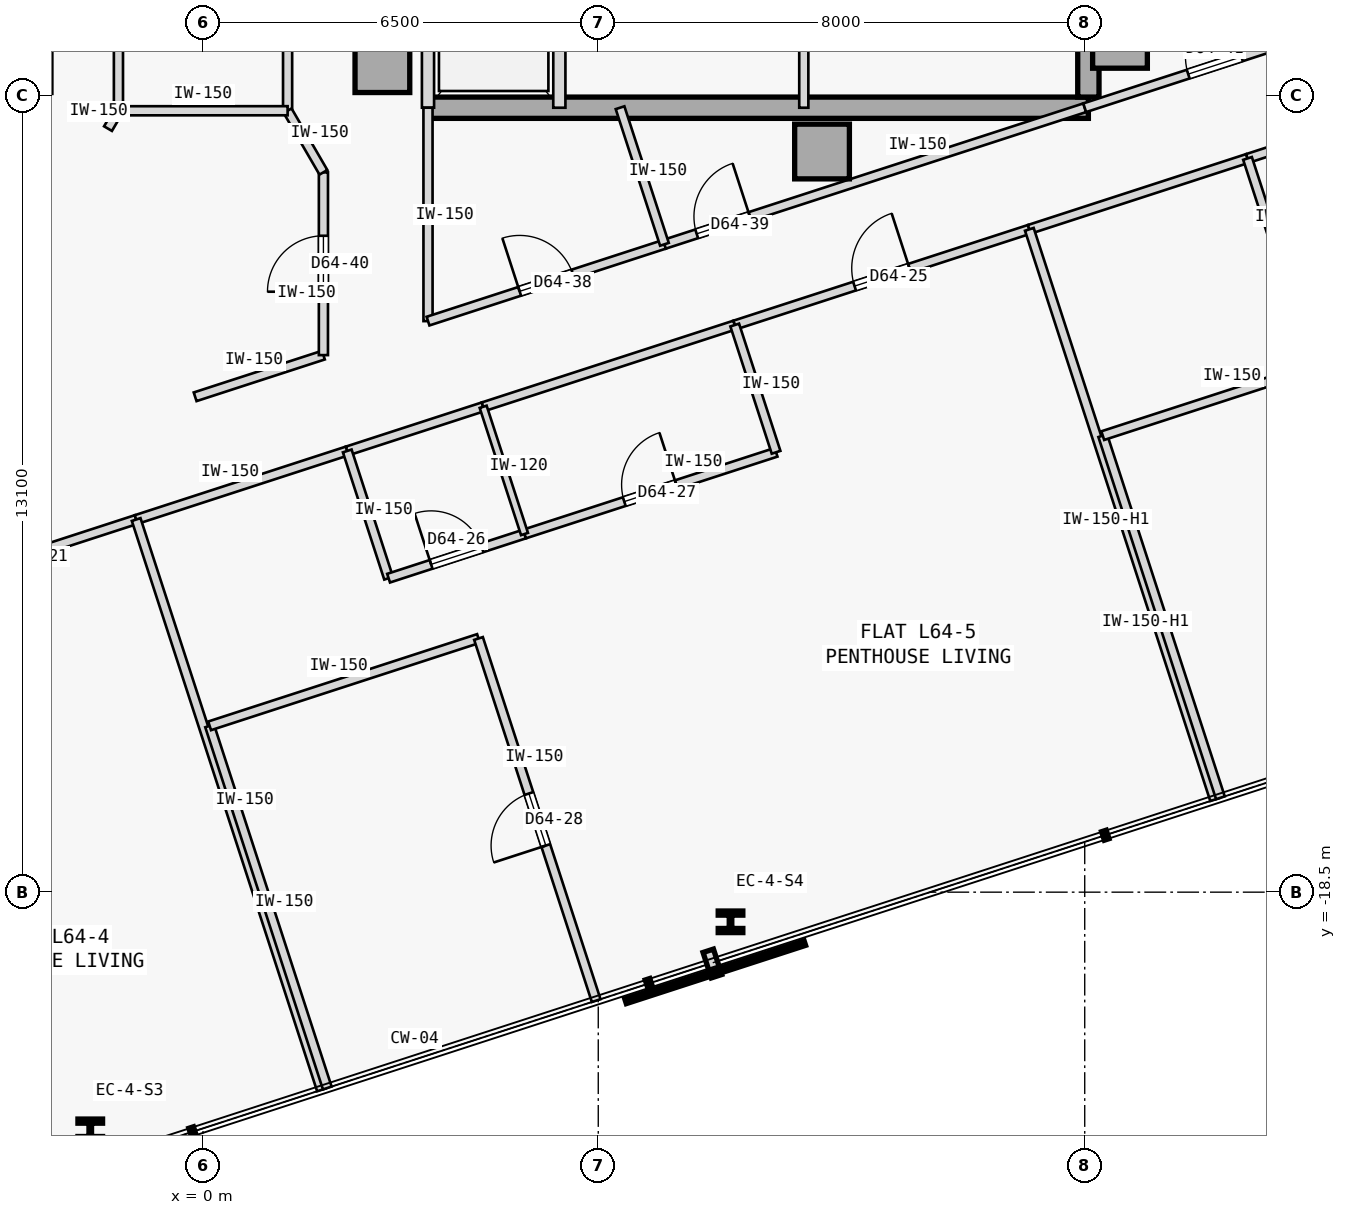
"""IFC4 building model, lengths in metres.
Left out: names, types, materials, properties, quantities, classifications, styles, units other than length and angle.
Written with IfcOpenShell. Run it as: python <this file> out.ifc"""

import sys

from ifc_helpers import new_model, si_unit, direction, frame, frame_2d, origin, origin_2d, place, context, subcontext, project, spatial, rectangle, i_section, extrude, element, fill, save


model = new_model("IFC4")
c1 = context("Model", 3, precision=1e-05, world=origin(), true_north=direction((0.0, 1.0)))
c2 = subcontext(c1, "Body", "Model", "MODEL_VIEW")
j1 = project(units=[si_unit("LENGTHUNIT", "METRE"), si_unit("PLANEANGLEUNIT", "RADIAN")], contexts=[c1])
p1 = place(None, origin())
s1 = spatial("IfcSite", under=j1, at=p1, CompositionType="ELEMENT")
p2 = place(p1, origin())
s2 = spatial("IfcBuilding", under=s1, at=p2, CompositionType="ELEMENT")
p3 = place(p2, frame((0.0, 0.0, 241.05)))
s3 = spatial("IfcBuildingStorey", under=s2, at=p3, CompositionType="ELEMENT", Elevation=241.05)
for number, where, z_axis, x_axis in (
    (1, (15.08, -4.5, 0.0), (0.0, 0.0, 1.0), (1.0, 0.0, 0.0)),
    (2, (10.18, -6.32, 0.0), (0.0, 0.0, 1.0), (1.0, 0.0, 0.0)),
    (3, (2.95, -4.9, 0.0), (0.0, 0.0, 1.0), (1.0, 0.0, 0.0)),
):
    element("IfcColumn", number, at=place(p3, frame(where, z_axis=z_axis, x_axis=x_axis)), inside=s3, PredefinedType="COLUMN", context=c2, shape_type="SweptSolid", body=[
        extrude(rectangle(XDim=0.9, YDim=0.9, at=origin_2d()), origin(), (0.0, 0.0, 1.0), 3.35),
    ])
p4 = place(p3, frame((3.7, -5.6, 0.0), z_axis=(0.0, 0.0, 1.0), x_axis=(1.0, 0.0, 0.0)))
e4 = element("IfcWall", 4, at=p4, inside=s3, PredefinedType="SHEAR", context=c2, shape_type="SweptSolid", body=[
    extrude(rectangle(XDim=10.86, YDim=0.35, at=frame_2d((5.43, 0.0))), origin(), (0.0, 0.0, 1.0), 3.125),
])
p5 = place(p3, frame((14.56, -5.425, 0.0), z_axis=(0.0, 0.0, 1.0), x_axis=(0.0, 1.0, 0.0)))
e5 = element("IfcWall", 5, at=p5, inside=s3, PredefinedType="SHEAR", context=c2, shape_type="SweptSolid", body=[
    extrude(rectangle(XDim=10.85, YDim=0.35, at=frame_2d((5.425, 0.0))), origin(), (0.0, 0.0, 1.0), 3.125),
])
for number, where, z_axis, x_axis in (
    (6, (-1.854, -22.409, 0.0), (0.0, 0.0, 1.0), (1.0, 0.0, 0.0)),
    (7, (8.675, -18.988, 0.0), (0.0, 0.0, 1.0), (1.0, 0.0, 0.0)),
):
    element("IfcColumn", number, at=place(p3, frame(where, z_axis=z_axis, x_axis=x_axis)), inside=s3, PredefinedType="COLUMN", context=c2, shape_type="SweptSolid", body=[
        extrude(i_section(OverallWidth=0.405, OverallDepth=0.355, WebThickness=0.042, FlangeThickness=0.068, FilletRadius=0.015, at=origin_2d()), origin(), (0.0, 0.0, 1.0), 3.35),
    ])
for number, where, z_axis, x_axis in (
    (8, (3.7, -5.6, 0.0), (0.0, 0.0, 1.0), (0.0, 1.0, 0.0)),
    (9, (5.86, -5.6, 0.0), (0.0, 0.0, 1.0), (0.0, 1.0, 0.0)),
):
    element("IfcWall", number, at=place(p3, frame(where, z_axis=z_axis, x_axis=x_axis)), inside=s3, PredefinedType="STANDARD", context=c2, shape_type="SweptSolid", body=[
        extrude(rectangle(XDim=2.65, YDim=0.2, at=frame_2d((1.325, 0.0))), origin(), (0.0, 0.0, 1.0), 3.125),
    ])
p6 = place(p3, frame((9.88, -5.6, 0.0), z_axis=(0.0, 0.0, 1.0), x_axis=(0.0, 1.0, 0.0)))
e10 = element("IfcWall", 10, at=p6, inside=s3, PredefinedType="PARTITIONING", context=c2, shape_type="SweptSolid", body=[
    extrude(rectangle(XDim=2.65, YDim=0.15, at=frame_2d((1.325, 0.0))), origin(), (0.0, 0.0, 1.0), 3.125),
])
p7 = place(p3, frame((-1.391, -5.65, 0.0), z_axis=(0.0, 0.0, 1.0), x_axis=(-8.6422954e-05, 0.999999996266, 0.0)))
e11 = element("IfcWall", 11, at=p7, inside=s3, PredefinedType="PARTITIONING", context=c2, shape_type="SweptSolid", body=[
    extrude(rectangle(XDim=11.3, YDim=0.15, at=frame_2d((5.65, 0.0))), origin(), (0.0, 0.0, 1.0), 3.125),
])
p8 = place(p7, frame((5.175, 0.0, 0.0)))
e12 = element("IfcOpeningElement", 12, at=p8, cuts=e11, PredefinedType="OPENING", context=c2, shape_type="SweptSolid", body=[
    extrude(rectangle(XDim=0.95, YDim=2.15, at=frame_2d((0.475, 1.075))), frame((0.0, 0.085, 0.0), z_axis=(0.0, -1.0, 0.0), x_axis=(1.0, 0.0, 0.0)), (0.0, 0.0, 1.0), 0.17),
])
p9 = place(p3, frame((1.391, -5.648, 0.0), z_axis=(0.0, 0.0, 1.0), x_axis=(-4.3218947e-05, 0.999999999066, 0.0)))
e13 = element("IfcWall", 13, at=p9, inside=s3, PredefinedType="PARTITIONING", context=c2, shape_type="SweptSolid", body=[
    extrude(rectangle(XDim=11.298, YDim=0.15, at=frame_2d((5.649, 0.0))), origin(), (0.0, 0.0, 1.0), 3.125),
])
p10 = place(p3, frame((-4.856, -13.593, 0.0), z_axis=(0.0, 0.0, 1.0), x_axis=(0.951054051148, 0.309024581215, 0.0)))
e14 = element("IfcWall", 14, at=p10, inside=s3, PredefinedType="PARTITIONING", context=c2, shape_type="SweptSolid", body=[
    extrude(rectangle(XDim=3.95, YDim=0.15, at=frame_2d((1.975, 0.0))), origin(), (0.0, 0.0, 1.0), 3.125),
])
p11 = place(p10, frame((1.5, 0.0, 0.0)))
e15 = element("IfcOpeningElement", 15, at=p11, cuts=e14, PredefinedType="OPENING", context=c2, shape_type="SweptSolid", body=[
    extrude(rectangle(XDim=0.95, YDim=2.15, at=frame_2d((0.475, 1.075))), frame((0.0, 0.085, 0.0), z_axis=(0.0, -1.0, 0.0), x_axis=(1.0, 0.0, 0.0)), (0.0, 0.0, 1.0), 0.17),
])
p12 = place(p3, frame((-1.099, -12.372, 0.0), z_axis=(0.0, 0.0, 1.0), x_axis=(0.951057168147, 0.309014988174, 0.0)))
e16 = element("IfcWall", 16, at=p12, inside=s3, PredefinedType="PARTITIONING", context=c2, shape_type="SweptSolid", body=[
    extrude(rectangle(XDim=3.65, YDim=0.15, at=frame_2d((1.825, 0.0))), origin(), (0.0, 0.0, 1.0), 3.125),
])
p13 = place(p3, frame((8.744, -9.174, 0.0), z_axis=(0.0, 0.0, 1.0), x_axis=(0.95105238152, 0.309029719615, 0.0)))
e17 = element("IfcWall", 17, at=p13, inside=s3, PredefinedType="PARTITIONING", context=c2, shape_type="SweptSolid", body=[
    extrude(rectangle(XDim=5.094, YDim=0.15, at=frame_2d((2.547, 0.0))), origin(), (0.0, 0.0, 1.0), 3.125),
])
p14 = place(p13, frame((2.072, 0.0, 0.0)))
e18 = element("IfcOpeningElement", 18, at=p14, cuts=e17, PredefinedType="OPENING", context=c2, shape_type="SweptSolid", body=[
    extrude(rectangle(XDim=0.95, YDim=2.15, at=frame_2d((0.475, 1.075))), frame((0.0, 0.085, 0.0), z_axis=(0.0, -1.0, 0.0), x_axis=(1.0, 0.0, 0.0)), (0.0, 0.0, 1.0), 0.17),
])
p15 = place(p3, frame((2.372, -11.244, 0.0), z_axis=(0.0, 0.0, 1.0), x_axis=(0.951066131077, 0.308987401554, 0.0)))
e19 = element("IfcWall", 19, at=p15, inside=s3, PredefinedType="PARTITIONING", context=c2, shape_type="SweptSolid", body=[
    extrude(rectangle(XDim=2.35, YDim=0.15, at=frame_2d((1.175, 0.0))), origin(), (0.0, 0.0, 1.0), 3.125),
])
p16 = place(p3, frame((4.607, -10.518, 0.0), z_axis=(0.0, 0.0, 1.0), x_axis=(0.951052627573, 0.309028962374, 0.0)))
e20 = element("IfcWall", 20, at=p16, inside=s3, PredefinedType="PARTITIONING", context=c2, shape_type="SweptSolid", body=[
    extrude(rectangle(XDim=4.35, YDim=0.15, at=frame_2d((2.175, 0.0))), origin(), (0.0, 0.0, 1.0), 3.125),
])
p17 = place(p3, frame((13.589, -7.6, 0.0), z_axis=(0.0, 0.0, 1.0), x_axis=(0.95105023481, 0.30903632613, 0.0)))
e21 = element("IfcWall", 21, at=p17, inside=s3, PredefinedType="PARTITIONING", context=c2, shape_type="SweptSolid", body=[
    extrude(rectangle(XDim=3.773, YDim=0.15, at=frame_2d((1.886, 0.0))), origin(), (0.0, 0.0, 1.0), 3.125),
])
p18 = place(p3, frame((17.177, -6.434, 0.0), z_axis=(0.0, 0.0, 1.0), x_axis=(0.951066131077, 0.308987401554, 0.0)))
e22 = element("IfcWall", 22, at=p18, inside=s3, PredefinedType="PARTITIONING", context=c2, shape_type="SweptSolid", body=[
    extrude(rectangle(XDim=2.35, YDim=0.15, at=frame_2d((1.175, 0.0))), origin(), (0.0, 0.0, 1.0), 3.125),
])
p19 = place(p3, frame((3.7, -9.109, 0.0), z_axis=(0.0, 0.0, 1.0), x_axis=(-0.000139130433, 0.999999990321, 0.0)))
e23 = element("IfcWall", 23, at=p19, inside=s3, PredefinedType="PARTITIONING", context=c2, shape_type="SweptSolid", body=[
    extrude(rectangle(XDim=3.51, YDim=0.15, at=frame_2d((1.755, 0.0))), origin(), (0.0, 0.0, 1.0), 3.125),
])
p20 = place(p3, frame((3.7, -9.109, 0.0), z_axis=(0.0, 0.0, 1.0), x_axis=(0.95106259184, 0.308998295145, 0.0)))
e24 = element("IfcWall", 24, at=p20, inside=s3, PredefinedType="PARTITIONING", context=c2, shape_type="SweptSolid", body=[
    extrude(rectangle(XDim=4.088, YDim=0.15, at=frame_2d((2.044, 0.0))), origin(), (0.0, 0.0, 1.0), 3.125),
])
p21 = place(p20, frame((1.584, 0.0, 0.0)))
e25 = element("IfcOpeningElement", 25, at=p21, cuts=e24, PredefinedType="OPENING", context=c2, shape_type="SweptSolid", body=[
    extrude(rectangle(XDim=0.92, YDim=2.15, at=frame_2d((0.46, 1.075))), frame((0.0, 0.085, 0.0), z_axis=(0.0, -1.0, 0.0), x_axis=(1.0, 0.0, 0.0)), (0.0, 0.0, 1.0), 0.17),
])
p22 = place(p3, frame((7.588, -7.846, 0.0), z_axis=(0.0, 0.0, 1.0), x_axis=(0.951058013903, 0.309012385174, 0.0)))
e26 = element("IfcWall", 26, at=p22, inside=s3, PredefinedType="PARTITIONING", context=c2, shape_type="SweptSolid", body=[
    extrude(rectangle(XDim=7.267, YDim=0.15, at=frame_2d((3.634, 0.0))), origin(), (0.0, 0.0, 1.0), 3.125),
])
p23 = place(p22, frame((0.557, 0.0, 0.0)))
e27 = element("IfcOpeningElement", 27, at=p23, cuts=e26, PredefinedType="OPENING", context=c2, shape_type="SweptSolid", body=[
    extrude(rectangle(XDim=0.92, YDim=2.15, at=frame_2d((0.46, 1.075))), frame((0.0, 0.085, 0.0), z_axis=(0.0, -1.0, 0.0), x_axis=(1.0, 0.0, 0.0)), (0.0, 0.0, 1.0), 0.17),
])
p24 = place(p3, frame((-0.129, -10.354, 0.0), z_axis=(0.0, 0.0, 1.0), x_axis=(0.951066420845, 0.308986509643, 0.0)))
e28 = element("IfcWall", 28, at=p24, inside=s3, PredefinedType="PARTITIONING", context=c2, shape_type="SweptSolid", body=[
    extrude(rectangle(XDim=2.218, YDim=0.15, at=frame_2d((1.109, 0.0))), origin(), (0.0, 0.0, 1.0), 3.125),
])
p25 = place(p3, frame((-1.562, -5.944, 0.0), z_axis=(0.0, 0.0, 1.0), x_axis=(0.505387839696, 0.862892305845, 0.0)))
e29 = element("IfcWall", 29, at=p25, inside=s3, PredefinedType="PARTITIONING", context=c2, shape_type="SweptSolid", body=[
    extrude(rectangle(XDim=0.34, YDim=0.15, at=frame_2d((0.17, 0.0))), origin(), (0.0, 0.0, 1.0), 3.125),
])
p26 = place(p3, frame((1.98, -9.668, 0.0), z_axis=(0.0, 0.0, 1.0), x_axis=(8.1241368e-05, 0.9999999967, 0.0)))
e30 = element("IfcWall", 30, at=p26, inside=s3, PredefinedType="PARTITIONING", context=c2, shape_type="SweptSolid", body=[
    extrude(rectangle(XDim=3.005, YDim=0.15, at=frame_2d((1.502, 0.0))), origin(), (0.0, 0.0, 1.0), 3.125),
])
p27 = place(p26, frame((1.042, 0.0, 0.0)))
e31 = element("IfcOpeningElement", 31, at=p27, cuts=e30, PredefinedType="OPENING", context=c2, shape_type="SweptSolid", body=[
    extrude(rectangle(XDim=0.92, YDim=2.15, at=frame_2d((0.46, 1.075))), frame((0.0, 0.085, 0.0), z_axis=(0.0, -1.0, 0.0), x_axis=(1.0, 0.0, 0.0)), (0.0, 0.0, 1.0), 0.17),
])
p28 = place(p3, frame((1.391, -5.649, 0.0), z_axis=(0.0, 0.0, 1.0), x_axis=(0.502522642426, -0.864564048437, 0.0)))
e32 = element("IfcWall", 32, at=p28, inside=s3, PredefinedType="PARTITIONING", context=c2, shape_type="SweptSolid", body=[
    extrude(rectangle(XDim=1.171, YDim=0.15, at=frame_2d((0.586, 0.0))), origin(), (0.0, 0.0, 1.0), 3.125),
])
p29 = place(p3, frame((14.5, -5.6, 0.0), z_axis=(0.0, 0.0, 1.0), x_axis=(0.951047546178, 0.309044600193, 0.0)))
e33 = element("IfcWall", 33, at=p29, inside=s3, PredefinedType="PARTITIONING", context=c2, shape_type="SweptSolid", body=[
    extrude(rectangle(XDim=3.461, YDim=0.15, at=frame_2d((1.73, 0.0))), origin(), (0.0, 0.0, 1.0), 3.125),
])
p30 = place(p29, frame((1.79, 0.0, 0.0)))
e34 = element("IfcOpeningElement", 34, at=p30, cuts=e33, PredefinedType="OPENING", context=c2, shape_type="SweptSolid", body=[
    extrude(rectangle(XDim=0.92, YDim=2.15, at=frame_2d((0.46, 1.075))), frame((0.0, 0.085, 0.0), z_axis=(0.0, -1.0, 0.0), x_axis=(1.0, 0.0, 0.0)), (0.0, 0.0, 1.0), 0.17),
])
p31 = place(p3, frame((-1.391, -5.65, 0.0), z_axis=(0.0, 0.0, 1.0), x_axis=(0.999999965344, 0.000263273356, 0.0)))
e35 = element("IfcWall", 35, at=p31, inside=s3, PredefinedType="PARTITIONING", context=c2, shape_type="SweptSolid", body=[
    extrude(rectangle(XDim=2.782, YDim=0.15, at=frame_2d((1.391, 0.0))), origin(), (0.0, 0.0, 1.0), 3.125),
])
p32 = place(p3, frame((1.948, -21.751, 0.0), z_axis=(0.0, 0.0, 1.0), x_axis=(-0.308999867152, 0.951062081097, 0.0)))
e36 = element("IfcWall", 36, at=p32, inside=s3, PredefinedType="PARTITIONING", context=c2, shape_type="SweptSolid", body=[
    extrude(rectangle(XDim=9.862, YDim=0.15, at=frame_2d((4.931, 0.0))), origin(), (0.0, 0.0, 1.0), 3.125),
])
p33 = place(p3, frame((3.052, -13.336, 0.0), z_axis=(0.0, 0.0, 1.0), x_axis=(-0.308960600764, 0.951074837842, 0.0)))
e37 = element("IfcWall", 37, at=p33, inside=s3, PredefinedType="PARTITIONING", context=c2, shape_type="SweptSolid", body=[
    extrude(rectangle(XDim=2.2, YDim=0.15, at=frame_2d((1.1, 0.0))), origin(), (0.0, 0.0, 1.0), 3.125),
])
p34 = place(p3, frame((3.052, -13.336, 0.0), z_axis=(0.0, 0.0, 1.0), x_axis=(0.951076048914, 0.308956872689, 0.0)))
e38 = element("IfcWall", 38, at=p34, inside=s3, PredefinedType="PARTITIONING", context=c2, shape_type="SweptSolid", body=[
    extrude(rectangle(XDim=2.35, YDim=0.15, at=frame_2d((1.175, 0.0))), origin(), (0.0, 0.0, 1.0), 3.125),
])
p35 = place(p34, frame((0.735, 0.0, 0.0)))
e39 = element("IfcOpeningElement", 39, at=p35, cuts=e38, PredefinedType="OPENING", context=c2, shape_type="SweptSolid", body=[
    extrude(rectangle(XDim=0.88, YDim=2.15, at=frame_2d((0.44, 1.075))), frame((0.0, 0.085, 0.0), z_axis=(0.0, -1.0, 0.0), x_axis=(1.0, 0.0, 0.0)), (0.0, 0.0, 1.0), 0.17),
])
p36 = place(p3, frame((5.287, -12.61, 0.0), z_axis=(0.0, 0.0, 1.0), x_axis=(0.951052627573, 0.309028962374, 0.0)))
e40 = element("IfcWall", 40, at=p36, inside=s3, PredefinedType="PARTITIONING", context=c2, shape_type="SweptSolid", body=[
    extrude(rectangle(XDim=4.35, YDim=0.15, at=frame_2d((2.175, 0.0))), origin(), (0.0, 0.0, 1.0), 3.125),
])
p37 = place(p36, frame((1.725, 0.0, 0.0)))
e41 = element("IfcOpeningElement", 41, at=p37, cuts=e40, PredefinedType="OPENING", context=c2, shape_type="SweptSolid", body=[
    extrude(rectangle(XDim=0.9, YDim=2.15, at=frame_2d((0.45, 1.075))), frame((0.0, 0.085, 0.0), z_axis=(0.0, -1.0, 0.0), x_axis=(1.0, 0.0, 0.0)), (0.0, 0.0, 1.0), 0.17),
])
p38 = place(p3, frame((9.424, -11.266, 0.0), z_axis=(0.0, 0.0, 1.0), x_axis=(-0.309060979314, 0.951042223598, 0.0)))
e42 = element("IfcWall", 42, at=p38, inside=s3, PredefinedType="PARTITIONING", context=c2, shape_type="SweptSolid", body=[
    extrude(rectangle(XDim=2.2, YDim=0.15, at=frame_2d((1.1, 0.0))), origin(), (0.0, 0.0, 1.0), 3.125),
])
p39 = place(p3, frame((2.043, -21.72, 0.0), z_axis=(0.0, 0.0, 1.0), x_axis=(-0.309013782848, 0.951057559777, 0.0)))
e43 = element("IfcWall", 43, at=p39, inside=s3, PredefinedType="PARTITIONING", context=c2, shape_type="SweptSolid", body=[
    extrude(rectangle(XDim=6.262, YDim=0.15, at=frame_2d((3.131, 0.0))), origin(), (0.0, 0.0, 1.0), 3.125),
])
p40 = place(p3, frame((0.108, -15.765, 0.0), z_axis=(0.0, 0.0, 1.0), x_axis=(0.951065702951, 0.308988719326, 0.0)))
e44 = element("IfcWall", 44, at=p40, inside=s3, PredefinedType="PARTITIONING", context=c2, shape_type="SweptSolid", body=[
    extrude(rectangle(XDim=4.65, YDim=0.15, at=frame_2d((2.325, 0.0))), origin(), (0.0, 0.0, 1.0), 3.125),
])
p41 = place(p3, frame((6.466, -20.284, 0.0), z_axis=(0.0, 0.0, 1.0), x_axis=(-0.309013782848, 0.951057559777, 0.0)))
e45 = element("IfcWall", 45, at=p41, inside=s3, PredefinedType="PARTITIONING", context=c2, shape_type="SweptSolid", body=[
    extrude(rectangle(XDim=6.262, YDim=0.15, at=frame_2d((3.131, 0.0))), origin(), (0.0, 0.0, 1.0), 3.125),
])
p42 = place(p41, frame((2.681, 0.0, 0.0)))
e46 = element("IfcOpeningElement", 46, at=p42, cuts=e45, PredefinedType="OPENING", context=c2, shape_type="SweptSolid", body=[
    extrude(rectangle(XDim=0.9, YDim=2.15, at=frame_2d((0.45, 1.075))), frame((0.0, 0.085, 0.0), z_axis=(0.0, -1.0, 0.0), x_axis=(1.0, 0.0, 0.0)), (0.0, 0.0, 1.0), 0.17),
])
p43 = place(p3, frame((16.636, -16.979, 0.0), z_axis=(0.0, 0.0, 1.0), x_axis=(-0.309022258842, 0.95105480575, 0.0)))
e47 = element("IfcWall", 47, at=p43, inside=s3, PredefinedType="PARTITIONING", context=c2, shape_type="SweptSolid", body=[
    extrude(rectangle(XDim=9.862, YDim=0.15, at=frame_2d((4.931, 0.0))), origin(), (0.0, 0.0, 1.0), 2.675),
])
p44 = place(p3, frame((5.287, -12.61, 0.0), z_axis=(0.0, 0.0, 1.0), x_axis=(-0.309060979314, 0.951042223598, 0.0)))
e48 = element("IfcWall", 48, at=p44, inside=s3, PredefinedType="PARTITIONING", context=c2, shape_type="SweptSolid", body=[
    extrude(rectangle(XDim=2.2, YDim=0.12, at=frame_2d((1.1, 0.0))), origin(), (0.0, 0.0, 1.0), 3.125),
])
p45 = place(p3, frame((17.857, -8.526, 0.0), z_axis=(0.0, 0.0, 1.0), x_axis=(-0.309060979314, 0.951042223598, 0.0)))
e49 = element("IfcWall", 49, at=p45, inside=s3, PredefinedType="PARTITIONING", context=c2, shape_type="SweptSolid", body=[
    extrude(rectangle(XDim=2.2, YDim=0.15, at=frame_2d((1.1, 0.0))), origin(), (0.0, 0.0, 1.0), 3.125),
])
p46 = place(p3, frame((16.731, -16.948, 0.0), z_axis=(0.0, 0.0, 1.0), x_axis=(-0.309013782848, 0.951057559777, 0.0)))
e50 = element("IfcWall", 50, at=p46, inside=s3, PredefinedType="PARTITIONING", context=c2, shape_type="SweptSolid", body=[
    extrude(rectangle(XDim=6.262, YDim=0.15, at=frame_2d((3.131, 0.0))), origin(), (0.0, 0.0, 1.0), 2.675),
])
p47 = place(p3, frame((14.796, -10.992, 0.0), z_axis=(0.0, 0.0, 1.0), x_axis=(0.951070715387, 0.308973290646, 0.0)))
e51 = element("IfcWall", 51, at=p47, inside=s3, PredefinedType="PARTITIONING", context=c2, shape_type="SweptSolid", body=[
    extrude(rectangle(XDim=4.65, YDim=0.15, at=frame_2d((2.325, 0.0))), origin(), (0.0, 0.0, 1.0), 3.125),
])
p48 = place(p3, frame((7.588, -7.846, 0.0), z_axis=(0.0, 0.0, 1.0), x_axis=(-0.309055688452, 0.951043942957, 0.0)))
e52 = element("IfcWall", 52, at=p48, inside=s3, PredefinedType="PARTITIONING", context=c2, shape_type="SweptSolid", body=[
    extrude(rectangle(XDim=2.362, YDim=0.15, at=frame_2d((1.181, 0.0))), origin(), (0.0, 0.0, 1.0), 3.125),
])
p49 = place(p14, origin())
e53 = element("IfcDoor", 53, at=p49, inside=s3, OperationType="SINGLE_SWING_RIGHT", PredefinedType="DOOR", context=c2, shape_type="SweptSolid", body=[
    extrude(rectangle(XDim=0.95, YDim=2.15, at=frame_2d((0.475, 1.075))), frame((0.0, 0.025, 0.0), z_axis=(0.0, -1.0, 0.0), x_axis=(1.0, 0.0, 0.0)), (0.0, 0.0, 1.0), 0.05),
])
fill(e18, e53)
p50 = place(p35, origin())
e54 = element("IfcDoor", 54, at=p50, inside=s3, OperationType="SINGLE_SWING_LEFT", PredefinedType="DOOR", context=c2, shape_type="SweptSolid", body=[
    extrude(rectangle(XDim=0.88, YDim=2.15, at=frame_2d((0.44, 1.075))), frame((0.0, 0.025, 0.0), z_axis=(0.0, -1.0, 0.0), x_axis=(1.0, 0.0, 0.0)), (0.0, 0.0, 1.0), 0.05),
])
fill(e39, e54)
p51 = place(p37, origin())
e55 = element("IfcDoor", 55, at=p51, inside=s3, OperationType="SINGLE_SWING_RIGHT", PredefinedType="DOOR", context=c2, shape_type="SweptSolid", body=[
    extrude(rectangle(XDim=0.9, YDim=2.15, at=frame_2d((0.45, 1.075))), frame((0.0, 0.025, 0.0), z_axis=(0.0, -1.0, 0.0), x_axis=(1.0, 0.0, 0.0)), (0.0, 0.0, 1.0), 0.05),
])
fill(e41, e55)
p52 = place(p42, origin())
e56 = element("IfcDoor", 56, at=p52, inside=s3, OperationType="SINGLE_SWING_LEFT", PredefinedType="DOOR", context=c2, shape_type="SweptSolid", body=[
    extrude(rectangle(XDim=0.9, YDim=2.15, at=frame_2d((0.45, 1.075))), frame((0.0, 0.025, 0.0), z_axis=(0.0, -1.0, 0.0), x_axis=(1.0, 0.0, 0.0)), (0.0, 0.0, 1.0), 0.05),
])
fill(e46, e56)
p53 = place(p21, origin())
e57 = element("IfcDoor", 57, at=p53, inside=s3, OperationType="SINGLE_SWING_LEFT", PredefinedType="DOOR", context=c2, shape_type="SweptSolid", body=[
    extrude(rectangle(XDim=0.92, YDim=2.15, at=frame_2d((0.46, 1.075))), frame((0.0, 0.025, 0.0), z_axis=(0.0, -1.0, 0.0), x_axis=(1.0, 0.0, 0.0)), (0.0, 0.0, 1.0), 0.05),
])
fill(e25, e57)
p54 = place(p23, origin())
e58 = element("IfcDoor", 58, at=p54, inside=s3, OperationType="SINGLE_SWING_RIGHT", PredefinedType="DOOR", context=c2, shape_type="SweptSolid", body=[
    extrude(rectangle(XDim=0.92, YDim=2.15, at=frame_2d((0.46, 1.075))), frame((0.0, 0.025, 0.0), z_axis=(0.0, -1.0, 0.0), x_axis=(1.0, 0.0, 0.0)), (0.0, 0.0, 1.0), 0.05),
])
fill(e27, e58)
p55 = place(p27, origin())
e59 = element("IfcDoor", 59, at=p55, inside=s3, OperationType="SINGLE_SWING_LEFT", PredefinedType="DOOR", context=c2, shape_type="SweptSolid", body=[
    extrude(rectangle(XDim=0.92, YDim=2.15, at=frame_2d((0.46, 1.075))), frame((0.0, 0.025, 0.0), z_axis=(0.0, -1.0, 0.0), x_axis=(1.0, 0.0, 0.0)), (0.0, 0.0, 1.0), 0.05),
])
fill(e31, e59)
p56 = place(p30, origin())
e60 = element("IfcDoor", 60, at=p56, inside=s3, OperationType="SINGLE_SWING_RIGHT", PredefinedType="DOOR", context=c2, shape_type="SweptSolid", body=[
    extrude(rectangle(XDim=0.92, YDim=2.15, at=frame_2d((0.46, 1.075))), frame((0.0, 0.025, 0.0), z_axis=(0.0, -1.0, 0.0), x_axis=(1.0, 0.0, 0.0)), (0.0, 0.0, 1.0), 0.05),
])
fill(e34, e60)
save(model, sys.argv[1])
